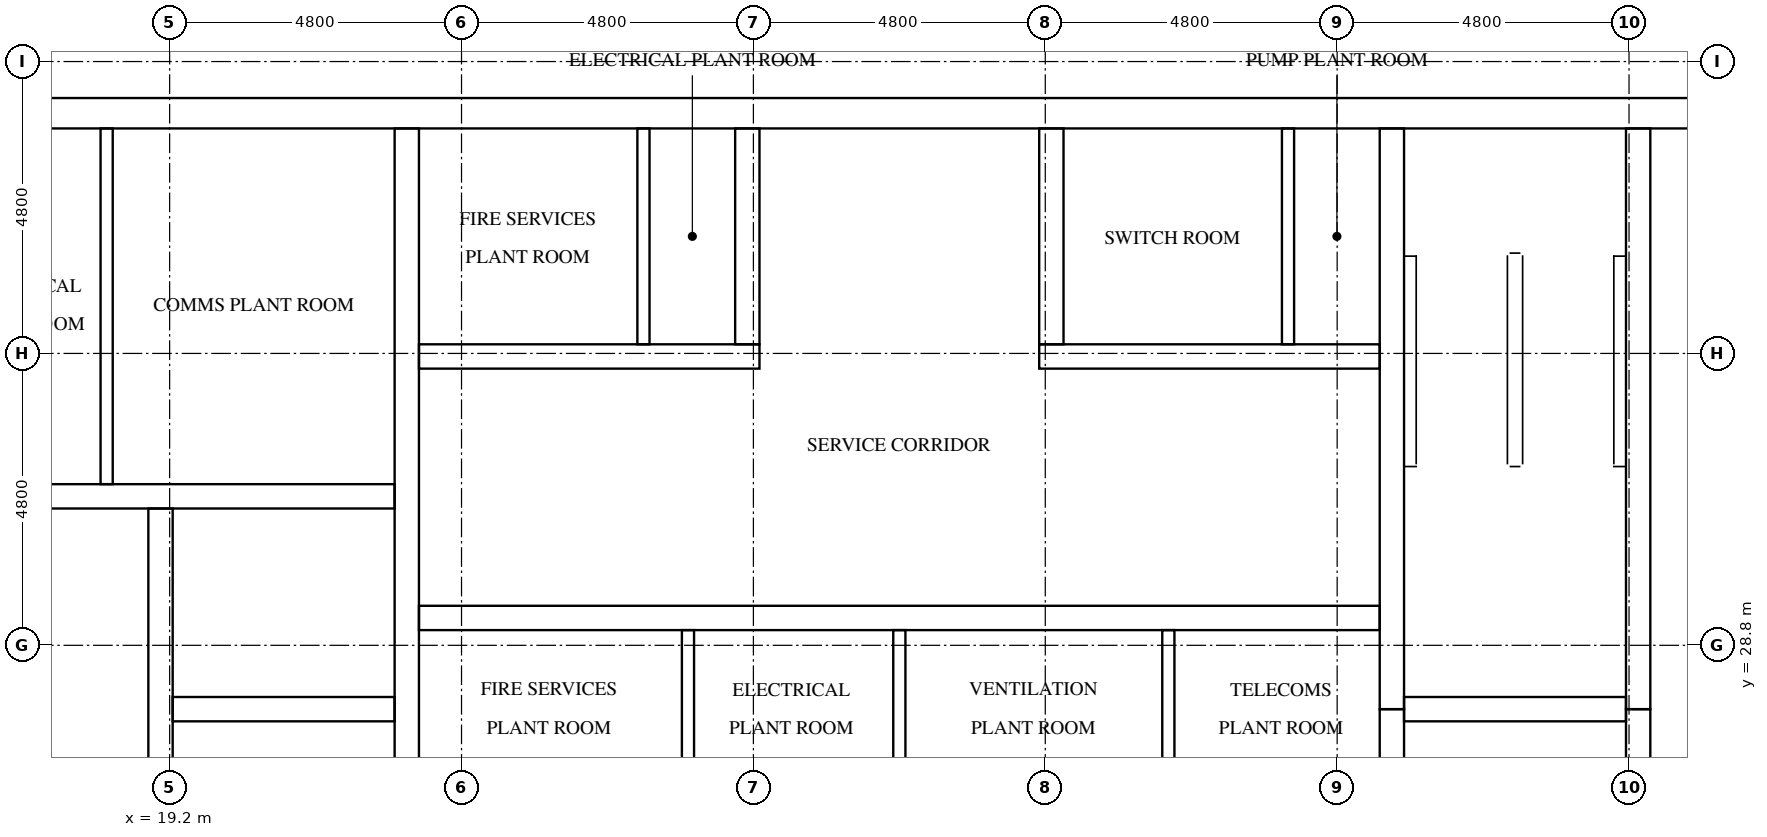
"""IFC4 building model, lengths in metres.
Left out: names, types, materials, properties, quantities, classifications, styles, units other than length and angle.
Written with IfcOpenShell. Run it as: python <this file> out.ifc"""

import sys

from ifc_helpers import new_model, si_unit, direction, frame, frame_2d, origin, place, context, subcontext, project, spatial, rectangle, extrude, element, fill, save


model = new_model("IFC4")
c1 = context("Model", 3, precision=1e-05, world=origin(), true_north=direction((0.0, 1.0)))
c2 = subcontext(c1, "Body", "Model", "MODEL_VIEW")
j1 = project(units=[si_unit("LENGTHUNIT", "METRE"), si_unit("PLANEANGLEUNIT", "RADIAN")], contexts=[c1])
p1 = place(None, origin())
s1 = spatial("IfcSite", under=j1, at=p1, CompositionType="ELEMENT")
p2 = place(p1, origin())
s2 = spatial("IfcBuilding", under=s1, at=p2, CompositionType="ELEMENT")
p3 = place(p2, frame((0.0, 0.0, 310.1)))
s3 = spatial("IfcBuildingStorey", under=s2, at=p3, CompositionType="ELEMENT", Elevation=310.1)
p4 = place(p3, frame((15.0, 37.55, 0.0), z_axis=(0.0, 0.0, 1.0), x_axis=(1.0, 0.0, 0.0)))
e1 = element("IfcWall", 1, at=p4, inside=s3, PredefinedType="SHEAR", context=c2, shape_type="SweptSolid", body=[
    extrude(rectangle(XDim=32.4, YDim=0.5, at=frame_2d((16.2, 0.0))), origin(), (0.0, 0.0, 1.0), 3.8),
])
p5 = place(p4, frame((15.3, 0.0, 0.0)))
e2 = element("IfcOpeningElement", 2, at=p5, cuts=e1, PredefinedType="OPENING", context=c2, shape_type="SweptSolid", body=[
    extrude(rectangle(XDim=1.8, YDim=2.1, at=frame_2d((0.9, 1.05))), frame((0.0, 0.26, 0.0), z_axis=(0.0, -1.0, 0.0), x_axis=(1.0, 0.0, 0.0)), (0.0, 0.0, 1.0), 0.52),
])
p6 = place(p4, frame((1.282, 0.0, 0.0)))
e3 = element("IfcOpeningElement", 3, at=p6, cuts=e1, PredefinedType="OPENING", context=c2, shape_type="SweptSolid", body=[
    extrude(rectangle(XDim=1.0, YDim=2.1, at=frame_2d((0.5, 1.05))), frame((0.0, 0.26, 0.0), z_axis=(0.0, -1.0, 0.0), x_axis=(1.0, 0.0, 0.0)), (0.0, 0.0, 1.0), 0.52),
])
p7 = place(p4, frame((5.082, 0.0, 0.0)))
e4 = element("IfcOpeningElement", 4, at=p7, cuts=e1, PredefinedType="OPENING", context=c2, shape_type="SweptSolid", body=[
    extrude(rectangle(XDim=1.0, YDim=2.1, at=frame_2d((0.5, 1.05))), frame((0.0, 0.26, 0.0), z_axis=(0.0, -1.0, 0.0), x_axis=(1.0, 0.0, 0.0)), (0.0, 0.0, 1.0), 0.52),
])
p8 = place(p3, frame((19.05, 15.5, 0.0), z_axis=(0.0, 0.0, 1.0), x_axis=(0.0, 1.0, 0.0)))
e5 = element("IfcWall", 5, at=p8, inside=s3, PredefinedType="SHEAR", context=c2, shape_type="SweptSolid", body=[
    extrude(rectangle(XDim=15.55, YDim=0.4, at=frame_2d((7.775, 0.0))), origin(), (0.0, 0.0, 1.0), 3.8),
])
p9 = place(p8, frame((9.95, 0.0, 0.0)))
e6 = element("IfcOpeningElement", 6, at=p9, cuts=e5, PredefinedType="OPENING", context=c2, shape_type="SweptSolid", body=[
    extrude(rectangle(XDim=1.1, YDim=2.1, at=frame_2d((0.55, 1.05))), frame((0.0, 0.21, 0.0), z_axis=(0.0, -1.0, 0.0), x_axis=(1.0, 0.0, 0.0)), (0.0, 0.0, 1.0), 0.42),
])
p10 = place(p8, frame((13.45, 0.0, 0.0)))
e7 = element("IfcOpeningElement", 7, at=p10, cuts=e5, PredefinedType="OPENING", context=c2, shape_type="SweptSolid", body=[
    extrude(rectangle(XDim=1.1, YDim=2.1, at=frame_2d((0.55, 1.05))), frame((0.0, 0.21, 0.0), z_axis=(0.0, -1.0, 0.0), x_axis=(1.0, 0.0, 0.0)), (0.0, 0.0, 1.0), 0.42),
])
p11 = place(p8, frame((0.7, 0.0, 0.0)))
e8 = element("IfcOpeningElement", 8, at=p11, cuts=e5, PredefinedType="OPENING", context=c2, shape_type="SweptSolid", body=[
    extrude(rectangle(XDim=1.2, YDim=2.1, at=frame_2d((0.6, 1.05))), frame((0.0, 0.21, 0.0), z_axis=(0.0, -1.0, 0.0), x_axis=(1.0, 0.0, 0.0)), (0.0, 0.0, 1.0), 0.42),
])
p12 = place(p3, frame((23.1, 15.5, 0.0), z_axis=(0.0, 0.0, 1.0), x_axis=(0.0, 1.0, 0.0)))
e9 = element("IfcWall", 9, at=p12, inside=s3, PredefinedType="SHEAR", context=c2, shape_type="SweptSolid", body=[
    extrude(rectangle(XDim=21.8, YDim=0.4, at=frame_2d((10.9, 0.0))), origin(), (0.0, 0.0, 1.0), 3.8),
])
p13 = place(p3, frame((39.3, 24.25, 0.0), z_axis=(0.0, 0.0, 1.0), x_axis=(0.0, 1.0, 0.0)))
e10 = element("IfcWall", 10, at=p13, inside=s3, PredefinedType="SHEAR", context=c2, shape_type="SweptSolid", body=[
    extrude(rectangle(XDim=3.5, YDim=0.4, at=frame_2d((1.75, 0.0))), origin(), (0.0, 0.0, 1.0), 3.8),
])
p14 = place(p3, frame((39.3, 27.75, 0.0), z_axis=(0.0, 0.0, 1.0), x_axis=(0.0, 1.0, 0.0)))
e11 = element("IfcWall", 11, at=p14, inside=s3, PredefinedType="SHEAR", context=c2, shape_type="SweptSolid", body=[
    extrude(rectangle(XDim=9.55, YDim=0.4, at=frame_2d((4.775, 0.0))), origin(), (0.0, 0.0, 1.0), 3.8),
])
p15 = place(p3, frame((43.35, 24.25, 0.0), z_axis=(0.0, 0.0, 1.0), x_axis=(0.0, 1.0, 0.0)))
e12 = element("IfcWall", 12, at=p15, inside=s3, PredefinedType="SHEAR", context=c2, shape_type="SweptSolid", body=[
    extrude(rectangle(XDim=3.5, YDim=0.4, at=frame_2d((1.75, 0.0))), origin(), (0.0, 0.0, 1.0), 3.8),
])
p16 = place(p15, frame((1.2, 0.0, 0.0)))
e13 = element("IfcOpeningElement", 13, at=p16, cuts=e12, PredefinedType="OPENING", context=c2, shape_type="SweptSolid", body=[
    extrude(rectangle(XDim=1.1, YDim=2.1, at=frame_2d((0.55, 1.05))), frame((0.0, 0.21, 0.0), z_axis=(0.0, -1.0, 0.0), x_axis=(1.0, 0.0, 0.0)), (0.0, 0.0, 1.0), 0.42),
])
p17 = place(p3, frame((43.35, 27.75, 0.0), z_axis=(0.0, 0.0, 1.0), x_axis=(0.0, 1.0, 0.0)))
e14 = element("IfcWall", 14, at=p17, inside=s3, PredefinedType="SHEAR", context=c2, shape_type="SweptSolid", body=[
    extrude(rectangle(XDim=9.55, YDim=0.4, at=frame_2d((4.775, 0.0))), origin(), (0.0, 0.0, 1.0), 3.8),
])
p18 = place(p17, frame((7.65, 0.0, 0.0)))
e15 = element("IfcOpeningElement", 15, at=p18, cuts=e14, PredefinedType="OPENING", context=c2, shape_type="SweptSolid", body=[
    extrude(rectangle(XDim=1.2, YDim=2.1, at=frame_2d((0.6, 1.05))), frame((0.0, 0.21, 0.0), z_axis=(0.0, -1.0, 0.0), x_axis=(1.0, 0.0, 0.0)), (0.0, 0.0, 1.0), 0.42),
])
p19 = place(p3, frame((19.25, 27.75, 0.0), z_axis=(0.0, 0.0, 1.0), x_axis=(1.0, 0.0, 0.0)))
e16 = element("IfcWall", 16, at=p19, inside=s3, PredefinedType="SHEAR", context=c2, shape_type="SweptSolid", body=[
    extrude(rectangle(XDim=3.65, YDim=0.4, at=frame_2d((1.825, 0.0))), origin(), (0.0, 0.0, 1.0), 3.8),
])
p20 = place(p3, frame((15.5, 31.25, 0.0), z_axis=(0.0, 0.0, 1.0), x_axis=(1.0, 0.0, 0.0)))
e17 = element("IfcWall", 17, at=p20, inside=s3, PredefinedType="SHEAR", context=c2, shape_type="SweptSolid", body=[
    extrude(rectangle(XDim=7.4, YDim=0.4, at=frame_2d((3.7, 0.0))), origin(), (0.0, 0.0, 1.0), 3.8),
])
p21 = place(p3, frame((39.5, 27.75, 0.0), z_axis=(0.0, 0.0, 1.0), x_axis=(1.0, 0.0, 0.0)))
e18 = element("IfcWall", 18, at=p21, inside=s3, PredefinedType="SHEAR", context=c2, shape_type="SweptSolid", body=[
    extrude(rectangle(XDim=3.65, YDim=0.4, at=frame_2d((1.825, 0.0))), origin(), (0.0, 0.0, 1.0), 3.8),
])
p22 = place(p3, frame((23.3, 29.25, 0.0), z_axis=(0.0, 0.0, 1.0), x_axis=(1.0, 0.0, 0.0)))
e19 = element("IfcWall", 19, at=p22, inside=s3, PredefinedType="SHEAR", context=c2, shape_type="SweptSolid", body=[
    extrude(rectangle(XDim=15.8, YDim=0.4, at=frame_2d((7.9, 0.0))), origin(), (0.0, 0.0, 1.0), 3.8),
])
p23 = place(p22, frame((1.662, 0.0, 0.0)))
e20 = element("IfcOpeningElement", 20, at=p23, cuts=e19, PredefinedType="OPENING", context=c2, shape_type="SweptSolid", body=[
    extrude(rectangle(XDim=1.0, YDim=2.1, at=frame_2d((0.5, 1.05))), frame((0.0, 0.21, 0.0), z_axis=(0.0, -1.0, 0.0), x_axis=(1.0, 0.0, 0.0)), (0.0, 0.0, 1.0), 0.42),
])
p24 = place(p22, frame((5.662, 0.0, 0.0)))
e21 = element("IfcOpeningElement", 21, at=p24, cuts=e19, PredefinedType="OPENING", context=c2, shape_type="SweptSolid", body=[
    extrude(rectangle(XDim=1.0, YDim=2.1, at=frame_2d((0.5, 1.05))), frame((0.0, 0.21, 0.0), z_axis=(0.0, -1.0, 0.0), x_axis=(1.0, 0.0, 0.0)), (0.0, 0.0, 1.0), 0.42),
])
p25 = place(p22, frame((9.612, 0.0, 0.0)))
e22 = element("IfcOpeningElement", 22, at=p25, cuts=e19, PredefinedType="OPENING", context=c2, shape_type="SweptSolid", body=[
    extrude(rectangle(XDim=1.0, YDim=2.1, at=frame_2d((0.5, 1.05))), frame((0.0, 0.21, 0.0), z_axis=(0.0, -1.0, 0.0), x_axis=(1.0, 0.0, 0.0)), (0.0, 0.0, 1.0), 0.42),
])
p26 = place(p22, frame((13.612, 0.0, 0.0)))
e23 = element("IfcOpeningElement", 23, at=p26, cuts=e19, PredefinedType="OPENING", context=c2, shape_type="SweptSolid", body=[
    extrude(rectangle(XDim=1.0, YDim=2.1, at=frame_2d((0.5, 1.05))), frame((0.0, 0.21, 0.0), z_axis=(0.0, -1.0, 0.0), x_axis=(1.0, 0.0, 0.0)), (0.0, 0.0, 1.0), 0.42),
])
p27 = place(p3, frame((23.3, 33.55, 0.0), z_axis=(0.0, 0.0, 1.0), x_axis=(1.0, 0.0, 0.0)))
e24 = element("IfcWall", 24, at=p27, inside=s3, PredefinedType="SHEAR", context=c2, shape_type="SweptSolid", body=[
    extrude(rectangle(XDim=5.6, YDim=0.4, at=frame_2d((2.8, 0.0))), origin(), (0.0, 0.0, 1.0), 3.8),
])
p28 = place(p27, frame((1.296, 0.0, 0.0)))
e25 = element("IfcOpeningElement", 25, at=p28, cuts=e24, PredefinedType="OPENING", context=c2, shape_type="SweptSolid", body=[
    extrude(rectangle(XDim=1.0, YDim=2.1, at=frame_2d((0.5, 1.05))), frame((0.0, 0.21, 0.0), z_axis=(0.0, -1.0, 0.0), x_axis=(1.0, 0.0, 0.0)), (0.0, 0.0, 1.0), 0.42),
])
p29 = place(p27, frame((3.996, 0.0, 0.0)))
e26 = element("IfcOpeningElement", 26, at=p29, cuts=e24, PredefinedType="OPENING", context=c2, shape_type="SweptSolid", body=[
    extrude(rectangle(XDim=1.0, YDim=2.1, at=frame_2d((0.5, 1.05))), frame((0.0, 0.21, 0.0), z_axis=(0.0, -1.0, 0.0), x_axis=(1.0, 0.0, 0.0)), (0.0, 0.0, 1.0), 0.42),
])
p30 = place(p3, frame((33.5, 33.55, 0.0), z_axis=(0.0, 0.0, 1.0), x_axis=(1.0, 0.0, 0.0)))
e27 = element("IfcWall", 27, at=p30, inside=s3, PredefinedType="SHEAR", context=c2, shape_type="SweptSolid", body=[
    extrude(rectangle(XDim=5.6, YDim=0.4, at=frame_2d((2.8, 0.0))), origin(), (0.0, 0.0, 1.0), 3.8),
])
p31 = place(p30, frame((1.696, 0.0, 0.0)))
e28 = element("IfcOpeningElement", 28, at=p31, cuts=e27, PredefinedType="OPENING", context=c2, shape_type="SweptSolid", body=[
    extrude(rectangle(XDim=1.0, YDim=2.1, at=frame_2d((0.5, 1.05))), frame((0.0, 0.21, 0.0), z_axis=(0.0, -1.0, 0.0), x_axis=(1.0, 0.0, 0.0)), (0.0, 0.0, 1.0), 0.42),
])
p32 = place(p30, frame((4.396, 0.0, 0.0)))
e29 = element("IfcOpeningElement", 29, at=p32, cuts=e27, PredefinedType="OPENING", context=c2, shape_type="SweptSolid", body=[
    extrude(rectangle(XDim=1.0, YDim=2.1, at=frame_2d((0.5, 1.05))), frame((0.0, 0.21, 0.0), z_axis=(0.0, -1.0, 0.0), x_axis=(1.0, 0.0, 0.0)), (0.0, 0.0, 1.0), 0.42),
])
for number, where, z_axis, x_axis in (
    (30, (28.7, 33.75, 0.0), (0.0, 0.0, 1.0), (0.0, 1.0, 0.0)),
    (31, (33.7, 33.75, 0.0), (0.0, 0.0, 1.0), (0.0, 1.0, 0.0)),
):
    element("IfcWall", number, at=place(p3, frame(where, z_axis=z_axis, x_axis=x_axis)), inside=s3, PredefinedType="SHEAR", context=c2, shape_type="SweptSolid", body=[
        extrude(rectangle(XDim=3.55, YDim=0.4, at=frame_2d((1.775, 0.0))), origin(), (0.0, 0.0, 1.0), 3.8),
    ])
p33 = place(p3, frame((18.164, 31.45, 0.0), z_axis=(0.0, 0.0, 1.0), x_axis=(0.0, 1.0, 0.0)))
e32 = element("IfcWall", 32, at=p33, inside=s3, PredefinedType="PARTITIONING", context=c2, shape_type="SweptSolid", body=[
    extrude(rectangle(XDim=5.85, YDim=0.2, at=frame_2d((2.925, 0.0))), origin(), (0.0, 0.0, 1.0), 3.8),
])
for number, where, z_axis, x_axis in (
    (33, (27.724, 26.35, 0.0), (0.0, 0.0, 1.0), (0.0, 1.0, 0.0)),
    (34, (31.2, 26.35, 0.0), (0.0, 0.0, 1.0), (0.0, 1.0, 0.0)),
    (35, (35.624, 26.35, 0.0), (0.0, 0.0, 1.0), (0.0, 1.0, 0.0)),
):
    element("IfcWall", number, at=place(p3, frame(where, z_axis=z_axis, x_axis=x_axis)), inside=s3, PredefinedType="PARTITIONING", context=c2, shape_type="SweptSolid", body=[
        extrude(rectangle(XDim=2.7, YDim=0.2, at=frame_2d((1.35, 0.0))), origin(), (0.0, 0.0, 1.0), 3.8),
    ])
for number, where, z_axis, x_axis in (
    (36, (26.992, 33.75, 0.0), (0.0, 0.0, 1.0), (0.0, 1.0, 0.0)),
    (37, (37.592, 33.75, 0.0), (0.0, 0.0, 1.0), (0.0, 1.0, 0.0)),
):
    element("IfcWall", number, at=place(p3, frame(where, z_axis=z_axis, x_axis=x_axis)), inside=s3, PredefinedType="PARTITIONING", context=c2, shape_type="SweptSolid", body=[
        extrude(rectangle(XDim=3.55, YDim=0.2, at=frame_2d((1.775, 0.0))), origin(), (0.0, 0.0, 1.0), 3.8),
    ])
p34 = place(p10, origin())
e38 = element("IfcDoor", 38, at=p34, inside=s3, OperationType="DOUBLE_DOOR_SLIDING", PredefinedType="DOOR", context=c2, shape_type="SweptSolid", body=[
    extrude(rectangle(XDim=1.1, YDim=2.1, at=frame_2d((0.55, 1.05))), frame((0.0, 0.025, 0.0), z_axis=(0.0, -1.0, 0.0), x_axis=(1.0, 0.0, 0.0)), (0.0, 0.0, 1.0), 0.05),
])
fill(e7, e38)
p35 = place(p18, origin())
e39 = element("IfcDoor", 39, at=p35, inside=s3, OperationType="SINGLE_SWING_RIGHT", PredefinedType="DOOR", context=c2, shape_type="SweptSolid", body=[
    extrude(rectangle(XDim=1.2, YDim=2.1, at=frame_2d((0.6, 1.05))), frame((0.0, 0.025, 0.0), z_axis=(0.0, -1.0, 0.0), x_axis=(1.0, 0.0, 0.0)), (0.0, 0.0, 1.0), 0.05),
])
fill(e15, e39)
p36 = place(p5, origin())
e40 = element("IfcDoor", 40, at=p36, inside=s3, OperationType="DOUBLE_DOOR_SINGLE_SWING", PredefinedType="DOOR", context=c2, shape_type="SweptSolid", body=[
    extrude(rectangle(XDim=1.8, YDim=2.1, at=frame_2d((0.9, 1.05))), frame((0.0, 0.025, 0.0), z_axis=(0.0, -1.0, 0.0), x_axis=(1.0, 0.0, 0.0)), (0.0, 0.0, 1.0), 0.05),
])
fill(e2, e40)
p37 = place(p6, origin())
e41 = element("IfcDoor", 41, at=p37, inside=s3, OperationType="SINGLE_SWING_LEFT", PredefinedType="DOOR", context=c2, shape_type="SweptSolid", body=[
    extrude(rectangle(XDim=1.0, YDim=2.1, at=frame_2d((0.5, 1.05))), frame((0.0, 0.025, 0.0), z_axis=(0.0, -1.0, 0.0), x_axis=(1.0, 0.0, 0.0)), (0.0, 0.0, 1.0), 0.05),
])
fill(e3, e41)
p38 = place(p7, origin())
e42 = element("IfcDoor", 42, at=p38, inside=s3, OperationType="SINGLE_SWING_RIGHT", PredefinedType="DOOR", context=c2, shape_type="SweptSolid", body=[
    extrude(rectangle(XDim=1.0, YDim=2.1, at=frame_2d((0.5, 1.05))), frame((0.0, 0.025, 0.0), z_axis=(0.0, -1.0, 0.0), x_axis=(1.0, 0.0, 0.0)), (0.0, 0.0, 1.0), 0.05),
])
fill(e4, e42)
p39 = place(p23, origin())
e43 = element("IfcDoor", 43, at=p39, inside=s3, OperationType="SINGLE_SWING_LEFT", PredefinedType="DOOR", context=c2, shape_type="SweptSolid", body=[
    extrude(rectangle(XDim=1.0, YDim=2.1, at=frame_2d((0.5, 1.05))), frame((0.0, 0.025, 0.0), z_axis=(0.0, -1.0, 0.0), x_axis=(1.0, 0.0, 0.0)), (0.0, 0.0, 1.0), 0.05),
])
fill(e20, e43)
p40 = place(p24, origin())
e44 = element("IfcDoor", 44, at=p40, inside=s3, OperationType="SINGLE_SWING_RIGHT", PredefinedType="DOOR", context=c2, shape_type="SweptSolid", body=[
    extrude(rectangle(XDim=1.0, YDim=2.1, at=frame_2d((0.5, 1.05))), frame((0.0, 0.025, 0.0), z_axis=(0.0, -1.0, 0.0), x_axis=(1.0, 0.0, 0.0)), (0.0, 0.0, 1.0), 0.05),
])
fill(e21, e44)
p41 = place(p25, origin())
e45 = element("IfcDoor", 45, at=p41, inside=s3, OperationType="SINGLE_SWING_LEFT", PredefinedType="DOOR", context=c2, shape_type="SweptSolid", body=[
    extrude(rectangle(XDim=1.0, YDim=2.1, at=frame_2d((0.5, 1.05))), frame((0.0, 0.025, 0.0), z_axis=(0.0, -1.0, 0.0), x_axis=(1.0, 0.0, 0.0)), (0.0, 0.0, 1.0), 0.05),
])
fill(e22, e45)
p42 = place(p26, origin())
e46 = element("IfcDoor", 46, at=p42, inside=s3, OperationType="SINGLE_SWING_RIGHT", PredefinedType="DOOR", context=c2, shape_type="SweptSolid", body=[
    extrude(rectangle(XDim=1.0, YDim=2.1, at=frame_2d((0.5, 1.05))), frame((0.0, 0.025, 0.0), z_axis=(0.0, -1.0, 0.0), x_axis=(1.0, 0.0, 0.0)), (0.0, 0.0, 1.0), 0.05),
])
fill(e23, e46)
p43 = place(p28, frame((1.0, 0.0, 0.0), z_axis=(0.0, 0.0, 1.0), x_axis=(-1.0, 0.0, 0.0)))
e47 = element("IfcDoor", 47, at=p43, inside=s3, OperationType="SINGLE_SWING_LEFT", PredefinedType="DOOR", context=c2, shape_type="SweptSolid", body=[
    extrude(rectangle(XDim=1.0, YDim=2.1, at=frame_2d((0.5, 1.05))), frame((0.0, 0.025, 0.0), z_axis=(0.0, -1.0, 0.0), x_axis=(1.0, 0.0, 0.0)), (0.0, 0.0, 1.0), 0.05),
])
fill(e25, e47)
p44 = place(p29, frame((1.0, 0.0, 0.0), z_axis=(0.0, 0.0, 1.0), x_axis=(-1.0, 0.0, 0.0)))
e48 = element("IfcDoor", 48, at=p44, inside=s3, OperationType="SINGLE_SWING_RIGHT", PredefinedType="DOOR", context=c2, shape_type="SweptSolid", body=[
    extrude(rectangle(XDim=1.0, YDim=2.1, at=frame_2d((0.5, 1.05))), frame((0.0, 0.025, 0.0), z_axis=(0.0, -1.0, 0.0), x_axis=(1.0, 0.0, 0.0)), (0.0, 0.0, 1.0), 0.05),
])
fill(e26, e48)
p45 = place(p31, frame((1.0, 0.0, 0.0), z_axis=(0.0, 0.0, 1.0), x_axis=(-1.0, 0.0, 0.0)))
e49 = element("IfcDoor", 49, at=p45, inside=s3, OperationType="SINGLE_SWING_LEFT", PredefinedType="DOOR", context=c2, shape_type="SweptSolid", body=[
    extrude(rectangle(XDim=1.0, YDim=2.1, at=frame_2d((0.5, 1.05))), frame((0.0, 0.025, 0.0), z_axis=(0.0, -1.0, 0.0), x_axis=(1.0, 0.0, 0.0)), (0.0, 0.0, 1.0), 0.05),
])
fill(e28, e49)
p46 = place(p32, frame((1.0, 0.0, 0.0), z_axis=(0.0, 0.0, 1.0), x_axis=(-1.0, 0.0, 0.0)))
e50 = element("IfcDoor", 50, at=p46, inside=s3, OperationType="SINGLE_SWING_RIGHT", PredefinedType="DOOR", context=c2, shape_type="SweptSolid", body=[
    extrude(rectangle(XDim=1.0, YDim=2.1, at=frame_2d((0.5, 1.05))), frame((0.0, 0.025, 0.0), z_axis=(0.0, -1.0, 0.0), x_axis=(1.0, 0.0, 0.0)), (0.0, 0.0, 1.0), 0.05),
])
fill(e29, e50)
save(model, sys.argv[1])
